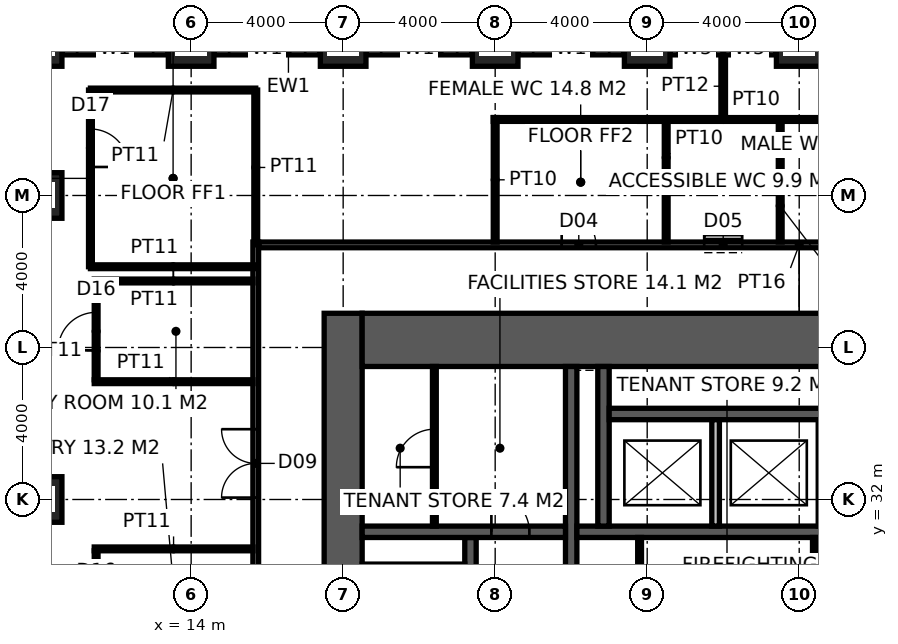
"""IFC4 building model, lengths in metres.
Left out: names, types, materials, properties, quantities, classifications, styles, units other than length and angle.
Written with IfcOpenShell. Run it as: python <this file> out.ifc"""

import sys

from ifc_helpers import new_model, si_unit, direction, frame, frame_2d, origin, origin_2d, place, context, subcontext, project, spatial, rectangle, hollow_rectangle, extrude, element, fill, save


model = new_model("IFC4")
c1 = context("Model", 3, precision=1e-05, world=origin(), true_north=direction((0.0, 1.0)))
c2 = subcontext(c1, "Body", "Model", "MODEL_VIEW")
j1 = project(units=[si_unit("LENGTHUNIT", "METRE"), si_unit("PLANEANGLEUNIT", "RADIAN")], contexts=[c1])
p1 = place(None, origin())
s1 = spatial("IfcSite", under=j1, at=p1, CompositionType="ELEMENT")
p2 = place(p1, origin())
s2 = spatial("IfcBuilding", under=s1, at=p2, CompositionType="ELEMENT")
p3 = place(p2, frame((0.0, 0.0, 19.0)))
s3 = spatial("IfcBuildingStorey", under=s2, at=p3, CompositionType="ELEMENT", Elevation=19.0)
for number, where, z_axis, x_axis in (
    (1, (10.0, 44.0, 0.0), (0.0, 0.0, 1.0), (1.0, 0.0, 0.0)),
    (2, (14.0, 44.0, 0.0), (0.0, 0.0, 1.0), (1.0, 0.0, 0.0)),
    (3, (18.0, 44.0, 0.0), (0.0, 0.0, 1.0), (1.0, 0.0, 0.0)),
    (4, (22.0, 44.0, 0.0), (0.0, 0.0, 1.0), (1.0, 0.0, 0.0)),
    (5, (26.0, 44.0, 0.0), (0.0, 0.0, 1.0), (1.0, 0.0, 0.0)),
    (6, (30.0, 44.0, 0.0), (0.0, 0.0, 1.0), (1.0, 0.0, 0.0)),
    (7, (10.0, 32.0, 0.0), (0.0, 0.0, 1.0), (1.0, 0.0, 0.0)),
    (8, (10.0, 40.0, 0.0), (0.0, 0.0, 1.0), (1.0, 0.0, 0.0)),
):
    element("IfcColumn", number, at=place(p3, frame(where, z_axis=z_axis, x_axis=x_axis)), inside=s3, PredefinedType="COLUMN", context=c2, shape_type="SweptSolid", body=[
        extrude(hollow_rectangle(XDim=1.2, YDim=1.2, WallThickness=0.1, at=origin_2d()), origin(), (0.0, 0.0, 1.0), 4.0),
    ])
p4 = place(p3, frame((18.0, 17.1, -0.15), z_axis=(0.0, 0.0, 1.0), x_axis=(0.0, 1.0, 0.0)))
e9 = element("IfcWall", 9, at=p4, inside=s3, PredefinedType="SHEAR", context=c2, shape_type="SweptSolid", body=[
    extrude(rectangle(XDim=19.8, YDim=1.0, at=frame_2d((9.9, 0.0))), origin(), (0.0, 0.0, 1.0), 4.0),
])
p5 = place(p3, frame((18.5, 36.2, -0.15), z_axis=(0.0, 0.0, 1.0), x_axis=(1.0, 0.0, 0.0)))
e10 = element("IfcWall", 10, at=p5, inside=s3, PredefinedType="SHEAR", context=c2, shape_type="SweptSolid", body=[
    extrude(rectangle(XDim=23.0, YDim=1.4, at=frame_2d((11.5, 0.0))), origin(), (0.0, 0.0, 1.0), 4.0),
])
p6 = place(p3, frame((24.0, 18.5, -0.15), z_axis=(0.0, 0.0, 1.0), x_axis=(0.0, 1.0, 0.0)))
e11 = element("IfcWall", 11, at=p6, inside=s3, PredefinedType="SHEAR", context=c2, shape_type="SweptSolid", body=[
    extrude(rectangle(XDim=17.0, YDim=0.3, at=frame_2d((8.5, 0.0))), origin(), (0.0, 0.0, 1.0), 4.0),
])
p7 = place(p6, frame((9.6, 0.0, 0.15)))
e12 = element("IfcOpeningElement", 12, at=p7, cuts=e11, PredefinedType="OPENING", context=c2, shape_type="SweptSolid", body=[
    extrude(rectangle(XDim=1.5, YDim=2.4, at=frame_2d((0.75, 1.2))), frame((0.0, 0.16, 0.0), z_axis=(0.0, -1.0, 0.0), x_axis=(1.0, 0.0, 0.0)), (0.0, 0.0, 1.0), 0.32),
])
p8 = place(p3, frame((24.15, 31.15, -0.15), z_axis=(0.0, 0.0, 1.0), x_axis=(1.0, 0.0, 0.0)))
e13 = element("IfcWall", 13, at=p8, inside=s3, PredefinedType="SHEAR", context=c2, shape_type="SweptSolid", body=[
    extrude(rectangle(XDim=11.25, YDim=0.3, at=frame_2d((5.625, 0.0))), origin(), (0.0, 0.0, 1.0), 4.0),
])
p9 = place(p8, frame((7.25, 0.0, 0.15)))
e14 = element("IfcOpeningElement", 14, at=p9, cuts=e13, PredefinedType="OPENING", context=c2, shape_type="SweptSolid", body=[
    extrude(rectangle(XDim=1.4, YDim=2.4, at=frame_2d((0.7, 1.2))), frame((0.0, 0.16, 0.0), z_axis=(0.0, -1.0, 0.0), x_axis=(1.0, 0.0, 0.0)), (0.0, 0.0, 1.0), 0.32),
])
p10 = place(p3, frame((21.35, 18.5, -0.15), z_axis=(0.0, 0.0, 1.0), x_axis=(0.0, 1.0, 0.0)))
e15 = element("IfcWall", 15, at=p10, inside=s3, PredefinedType="SHEAR", context=c2, shape_type="SweptSolid", body=[
    extrude(rectangle(XDim=12.5, YDim=0.3, at=frame_2d((6.25, 0.0))), origin(), (0.0, 0.0, 1.0), 4.0),
])
p11 = place(p10, frame((6.725, 0.0, 0.15)))
e16 = element("IfcOpeningElement", 16, at=p11, cuts=e15, PredefinedType="OPENING", context=c2, shape_type="SweptSolid", body=[
    extrude(rectangle(XDim=1.0, YDim=2.2, at=frame_2d((0.5, 1.1))), frame((0.0, 0.16, 0.0), z_axis=(0.0, -1.0, 0.0), x_axis=(1.0, 0.0, 0.0)), (0.0, 0.0, 1.0), 0.32),
])
p12 = place(p3, frame((18.5, 31.15, -0.15), z_axis=(0.0, 0.0, 1.0), x_axis=(1.0, 0.0, 0.0)))
e17 = element("IfcWall", 17, at=p12, inside=s3, PredefinedType="SHEAR", context=c2, shape_type="SweptSolid", body=[
    extrude(rectangle(XDim=5.35, YDim=0.3, at=frame_2d((2.675, 0.0))), origin(), (0.0, 0.0, 1.0), 4.0),
])
p13 = place(p12, frame((3.4, 0.0, 0.15)))
e18 = element("IfcOpeningElement", 18, at=p13, cuts=e17, PredefinedType="OPENING", context=c2, shape_type="SweptSolid", body=[
    extrude(rectangle(XDim=1.0, YDim=2.2, at=frame_2d((0.5, 1.1))), frame((0.0, 0.16, 0.0), z_axis=(0.0, -1.0, 0.0), x_axis=(1.0, 0.0, 0.0)), (0.0, 0.0, 1.0), 0.32),
])
p14 = place(p3, frame((24.85, 31.3, -0.15), z_axis=(0.0, 0.0, 1.0), x_axis=(0.0, 1.0, 0.0)))
e19 = element("IfcWall", 19, at=p14, inside=s3, PredefinedType="SHEAR", context=c2, shape_type="SweptSolid", body=[
    extrude(rectangle(XDim=4.2, YDim=0.3, at=frame_2d((2.1, 0.0))), origin(), (0.0, 0.0, 1.0), 4.0),
])
p15 = place(p3, frame((25.0, 34.25, -0.15), z_axis=(0.0, 0.0, 1.0), x_axis=(1.0, 0.0, 0.0)))
e20 = element("IfcWall", 20, at=p15, inside=s3, PredefinedType="SHEAR", context=c2, shape_type="SweptSolid", body=[
    extrude(rectangle(XDim=8.6, YDim=0.3, at=frame_2d((4.3, 0.0))), origin(), (0.0, 0.0, 1.0), 4.0),
])
p16 = place(p3, frame((27.8, 31.3, -0.15), z_axis=(0.0, 0.0, 1.0), x_axis=(0.0, 1.0, 0.0)))
e21 = element("IfcWall", 21, at=p16, inside=s3, PredefinedType="SOLIDWALL", context=c2, shape_type="SweptSolid", body=[
    extrude(rectangle(XDim=2.8, YDim=0.2, at=frame_2d((1.4, 0.0))), origin(), (0.0, 0.0, 1.0), 4.0),
])
p17 = place(p3, frame((20.4, 31.3, 0.0), z_axis=(0.0, 0.0, 1.0), x_axis=(0.0, 1.0, 0.0)))
e22 = element("IfcWall", 22, at=p17, inside=s3, PredefinedType="PARTITIONING", context=c2, shape_type="SweptSolid", body=[
    extrude(rectangle(XDim=4.2, YDim=0.1, at=frame_2d((2.1, 0.0))), origin(), (0.0, 0.0, 1.0), 3.85),
])
p18 = place(p17, frame((1.55, 0.0, 0.0)))
e23 = element("IfcOpeningElement", 23, at=p18, cuts=e22, PredefinedType="OPENING", context=c2, shape_type="SweptSolid", body=[
    extrude(rectangle(XDim=1.0, YDim=2.2, at=frame_2d((0.5, 1.1))), frame((0.0, 0.06, 0.0), z_axis=(0.0, -1.0, 0.0), x_axis=(1.0, 0.0, 0.0)), (0.0, 0.0, 1.0), 0.12),
])
for number, where, z_axis, x_axis in (
    (24, (25.8, 29.05, 0.0), (0.0, 0.0, 1.0), (0.0, 1.0, 0.0)),
    (25, (30.4, 29.05, 0.0), (0.0, 0.0, 1.0), (0.0, 1.0, 0.0)),
):
    element("IfcWall", number, at=place(p3, frame(where, z_axis=z_axis, x_axis=x_axis)), inside=s3, PredefinedType="PARTITIONING", context=c2, shape_type="SweptSolid", body=[
        extrude(rectangle(XDim=1.95, YDim=0.1, at=frame_2d((0.975, 0.0))), origin(), (0.0, 0.0, 1.0), 3.85),
    ])
p19 = place(p3, frame((15.7, 15.225, 0.0), z_axis=(0.0, 0.0, 1.0), x_axis=(0.0, 1.0, 0.0)))
e26 = element("IfcWall", 26, at=p19, inside=s3, PredefinedType="PARTITIONING", context=c2, shape_type="SweptSolid", body=[
    extrude(rectangle(XDim=23.55, YDim=0.15, at=frame_2d((11.775, 0.0))), origin(), (0.0, 0.0, 1.0), 3.85),
])
p20 = place(p19, frame((5.175, 0.0, 0.0)))
e27 = element("IfcOpeningElement", 27, at=p20, cuts=e26, PredefinedType="OPENING", context=c2, shape_type="SweptSolid", body=[
    extrude(rectangle(XDim=1.8, YDim=2.4, at=frame_2d((0.9, 1.2))), frame((0.0, 0.085, 0.0), z_axis=(0.0, -1.0, 0.0), x_axis=(1.0, 0.0, 0.0)), (0.0, 0.0, 1.0), 0.17),
])
p21 = place(p19, frame((16.825, 0.0, 0.0)))
e28 = element("IfcOpeningElement", 28, at=p21, cuts=e26, PredefinedType="OPENING", context=c2, shape_type="SweptSolid", body=[
    extrude(rectangle(XDim=1.8, YDim=2.4, at=frame_2d((0.9, 1.2))), frame((0.0, 0.085, 0.0), z_axis=(0.0, -1.0, 0.0), x_axis=(1.0, 0.0, 0.0)), (0.0, 0.0, 1.0), 0.17),
])
p22 = place(p3, frame((15.775, 38.7, 0.0), z_axis=(0.0, 0.0, 1.0), x_axis=(1.0, 0.0, 0.0)))
e29 = element("IfcWall", 29, at=p22, inside=s3, PredefinedType="PARTITIONING", context=c2, shape_type="SweptSolid", body=[
    extrude(rectangle(XDim=28.45, YDim=0.15, at=frame_2d((14.225, 0.0))), origin(), (0.0, 0.0, 1.0), 3.85),
])
p23 = place(p22, frame((7.975, 0.0, 0.0)))
e30 = element("IfcOpeningElement", 30, at=p23, cuts=e29, PredefinedType="OPENING", context=c2, shape_type="SweptSolid", body=[
    extrude(rectangle(XDim=0.9, YDim=2.1, at=frame_2d((0.45, 1.05))), frame((0.0, 0.085, 0.0), z_axis=(0.0, -1.0, 0.0), x_axis=(1.0, 0.0, 0.0)), (0.0, 0.0, 1.0), 0.17),
])
p24 = place(p22, frame((11.725, 0.0, 0.0)))
e31 = element("IfcOpeningElement", 31, at=p24, cuts=e29, PredefinedType="OPENING", context=c2, shape_type="SweptSolid", body=[
    extrude(rectangle(XDim=1.0, YDim=2.1, at=frame_2d((0.5, 1.05))), frame((0.0, 0.085, 0.0), z_axis=(0.0, -1.0, 0.0), x_axis=(1.0, 0.0, 0.0)), (0.0, 0.0, 1.0), 0.17),
])
p25 = place(p22, frame((15.575, 0.0, 0.0)))
e32 = element("IfcOpeningElement", 32, at=p25, cuts=e29, PredefinedType="OPENING", context=c2, shape_type="SweptSolid", body=[
    extrude(rectangle(XDim=0.9, YDim=2.1, at=frame_2d((0.45, 1.05))), frame((0.0, 0.085, 0.0), z_axis=(0.0, -1.0, 0.0), x_axis=(1.0, 0.0, 0.0)), (0.0, 0.0, 1.0), 0.17),
])
p26 = place(p3, frame((22.0, 38.775, 0.0), z_axis=(0.0, 0.0, 1.0), x_axis=(0.0, 1.0, 0.0)))
e33 = element("IfcWall", 33, at=p26, inside=s3, PredefinedType="PARTITIONING", context=c2, shape_type="SweptSolid", body=[
    extrude(rectangle(XDim=3.275, YDim=0.1, at=frame_2d((1.638, 0.0))), origin(), (0.0, 0.0, 1.0), 2.95),
])
p27 = place(p3, frame((21.95, 42.0, 0.0), z_axis=(0.0, 0.0, 1.0), x_axis=(1.0, 0.0, 0.0)))
e34 = element("IfcWall", 34, at=p27, inside=s3, PredefinedType="PARTITIONING", context=c2, shape_type="SweptSolid", body=[
    extrude(rectangle(XDim=12.1, YDim=0.1, at=frame_2d((6.05, 0.0))), origin(), (0.0, 0.0, 1.0), 3.85),
])
for number, where, z_axis, x_axis in (
    (35, (26.5, 38.775, 0.0), (0.0, 0.0, 1.0), (0.0, 1.0, 0.0)),
    (36, (29.5, 38.775, 0.0), (0.0, 0.0, 1.0), (0.0, 1.0, 0.0)),
):
    element("IfcWall", number, at=place(p3, frame(where, z_axis=z_axis, x_axis=x_axis)), inside=s3, PredefinedType="PARTITIONING", context=c2, shape_type="SweptSolid", body=[
        extrude(rectangle(XDim=3.175, YDim=0.1, at=frame_2d((1.587, 0.0))), origin(), (0.0, 0.0, 1.0), 3.85),
    ])
p28 = place(p3, frame((28.0, 42.05, 0.0), z_axis=(0.0, 0.0, 1.0), x_axis=(0.0, 1.0, 0.0)))
e37 = element("IfcWall", 37, at=p28, inside=s3, PredefinedType="PARTITIONING", context=c2, shape_type="SweptSolid", body=[
    extrude(rectangle(XDim=1.65, YDim=0.12, at=frame_2d((0.825, 0.0))), origin(), (0.0, 0.0, 1.0), 3.85),
])
for number, where, z_axis, x_axis in (
    (38, (11.45, 30.7, 0.0), (0.0, 0.0, 1.0), (1.0, 0.0, 0.0)),
    (39, (11.45, 35.1, 0.0), (0.0, 0.0, 1.0), (1.0, 0.0, 0.0)),
    (40, (11.45, 37.75, 0.0), (0.0, 0.0, 1.0), (1.0, 0.0, 0.0)),
):
    element("IfcWall", number, at=place(p3, frame(where, z_axis=z_axis, x_axis=x_axis)), inside=s3, PredefinedType="PARTITIONING", context=c2, shape_type="SweptSolid", body=[
        extrude(rectangle(XDim=4.175, YDim=0.1, at=frame_2d((2.087, 0.0))), origin(), (0.0, 0.0, 1.0), 3.85),
    ])
p29 = place(p3, frame((11.5, 27.35, 0.0), z_axis=(0.0, 0.0, 1.0), x_axis=(0.0, 1.0, 0.0)))
e41 = element("IfcWall", 41, at=p29, inside=s3, PredefinedType="PARTITIONING", context=c2, shape_type="SweptSolid", body=[
    extrude(rectangle(XDim=3.3, YDim=0.1, at=frame_2d((1.65, 0.0))), origin(), (0.0, 0.0, 1.0), 3.85),
])
p30 = place(p29, frame((1.15, 0.0, 0.0)))
e42 = element("IfcOpeningElement", 42, at=p30, cuts=e41, PredefinedType="OPENING", context=c2, shape_type="SweptSolid", body=[
    extrude(rectangle(XDim=1.0, YDim=2.2, at=frame_2d((0.5, 1.1))), frame((0.0, 0.06, 0.0), z_axis=(0.0, -1.0, 0.0), x_axis=(1.0, 0.0, 0.0)), (0.0, 0.0, 1.0), 0.12),
])
p31 = place(p3, frame((11.5, 35.15, 0.0), z_axis=(0.0, 0.0, 1.0), x_axis=(0.0, 1.0, 0.0)))
e43 = element("IfcWall", 43, at=p31, inside=s3, PredefinedType="PARTITIONING", context=c2, shape_type="SweptSolid", body=[
    extrude(rectangle(XDim=2.55, YDim=0.1, at=frame_2d((1.275, 0.0))), origin(), (0.0, 0.0, 1.0), 3.85),
])
p32 = place(p31, frame((0.775, 0.0, 0.0)))
e44 = element("IfcOpeningElement", 44, at=p32, cuts=e43, PredefinedType="OPENING", context=c2, shape_type="SweptSolid", body=[
    extrude(rectangle(XDim=1.0, YDim=2.2, at=frame_2d((0.5, 1.1))), frame((0.0, 0.06, 0.0), z_axis=(0.0, -1.0, 0.0), x_axis=(1.0, 0.0, 0.0)), (0.0, 0.0, 1.0), 0.12),
])
p33 = place(p3, frame((15.7, 38.7, 0.0), z_axis=(0.0, 0.0, 1.0), x_axis=(0.0, 1.0, 0.0)))
e45 = element("IfcWall", 45, at=p33, inside=s3, PredefinedType="PARTITIONING", context=c2, shape_type="SweptSolid", body=[
    extrude(rectangle(XDim=4.075, YDim=0.1, at=frame_2d((2.038, 0.0))), origin(), (0.0, 0.0, 1.0), 3.85),
])
p34 = place(p3, frame((15.7, 42.775, 0.0), z_axis=(0.0, 0.0, 1.0), x_axis=(-1.0, 0.0, 0.0)))
e46 = element("IfcWall", 46, at=p34, inside=s3, PredefinedType="PARTITIONING", context=c2, shape_type="SweptSolid", body=[
    extrude(rectangle(XDim=4.35, YDim=0.1, at=frame_2d((2.175, 0.0))), origin(), (0.0, 0.0, 1.0), 3.85),
])
p35 = place(p3, frame((11.35, 42.775, 0.0), z_axis=(0.0, 0.0, 1.0), x_axis=(0.0, -1.0, 0.0)))
e47 = element("IfcWall", 47, at=p35, inside=s3, PredefinedType="PARTITIONING", context=c2, shape_type="SweptSolid", body=[
    extrude(rectangle(XDim=4.65, YDim=0.1, at=frame_2d((2.325, 0.0))), origin(), (0.0, 0.0, 1.0), 3.85),
])
p36 = place(p35, frame((1.025, 0.0, 0.0)))
e48 = element("IfcOpeningElement", 48, at=p36, cuts=e47, PredefinedType="OPENING", context=c2, shape_type="SweptSolid", body=[
    extrude(rectangle(XDim=1.0, YDim=2.2, at=frame_2d((0.5, 1.1))), frame((0.0, 0.06, 0.0), z_axis=(0.0, -1.0, 0.0), x_axis=(1.0, 0.0, 0.0)), (0.0, 0.0, 1.0), 0.12),
])
p37 = place(p3, frame((11.35, 38.125, 0.0), z_axis=(0.0, 0.0, 1.0), x_axis=(1.0, 0.0, 0.0)))
e49 = element("IfcWall", 49, at=p37, inside=s3, PredefinedType="PARTITIONING", context=c2, shape_type="SweptSolid", body=[
    extrude(rectangle(XDim=4.35, YDim=0.1, at=frame_2d((2.175, 0.0))), origin(), (0.0, 0.0, 1.0), 3.85),
])
p38 = place(p3, frame((13.4, 43.85, 0.0), z_axis=(0.0, 0.0, 1.0), x_axis=(-1.0, 0.0, 0.0)))
e50 = element("IfcWall", 50, at=p38, inside=s3, PredefinedType="ELEMENTEDWALL", context=c2, shape_type="SweptSolid", body=[
    extrude(rectangle(XDim=2.8, YDim=0.3, at=frame_2d((1.4, 0.0))), origin(), (0.0, 0.0, 1.0), 2.85),
])
p39 = place(p38, frame((0.4, 0.0, 0.8)))
e51 = element("IfcOpeningElement", 51, at=p39, cuts=e50, PredefinedType="OPENING", context=c2, shape_type="SweptSolid", body=[
    extrude(rectangle(XDim=2.0, YDim=2.0, at=frame_2d((1.0, 1.0))), frame((0.0, 0.16, 0.0), z_axis=(0.0, -1.0, 0.0), x_axis=(1.0, 0.0, 0.0)), (0.0, 0.0, 1.0), 0.32),
])
p40 = place(p3, frame((17.4, 43.85, 0.0), z_axis=(0.0, 0.0, 1.0), x_axis=(-1.0, 0.0, 0.0)))
e52 = element("IfcWall", 52, at=p40, inside=s3, PredefinedType="ELEMENTEDWALL", context=c2, shape_type="SweptSolid", body=[
    extrude(rectangle(XDim=2.8, YDim=0.3, at=frame_2d((1.4, 0.0))), origin(), (0.0, 0.0, 1.0), 2.85),
])
p41 = place(p40, frame((0.4, 0.0, 0.8)))
e53 = element("IfcOpeningElement", 53, at=p41, cuts=e52, PredefinedType="OPENING", context=c2, shape_type="SweptSolid", body=[
    extrude(rectangle(XDim=2.0, YDim=2.0, at=frame_2d((1.0, 1.0))), frame((0.0, 0.16, 0.0), z_axis=(0.0, -1.0, 0.0), x_axis=(1.0, 0.0, 0.0)), (0.0, 0.0, 1.0), 0.32),
])
p42 = place(p3, frame((21.4, 43.85, 0.0), z_axis=(0.0, 0.0, 1.0), x_axis=(-1.0, 0.0, 0.0)))
e54 = element("IfcWall", 54, at=p42, inside=s3, PredefinedType="ELEMENTEDWALL", context=c2, shape_type="SweptSolid", body=[
    extrude(rectangle(XDim=2.8, YDim=0.3, at=frame_2d((1.4, 0.0))), origin(), (0.0, 0.0, 1.0), 2.85),
])
p43 = place(p42, frame((0.4, 0.0, 0.8)))
e55 = element("IfcOpeningElement", 55, at=p43, cuts=e54, PredefinedType="OPENING", context=c2, shape_type="SweptSolid", body=[
    extrude(rectangle(XDim=2.0, YDim=2.0, at=frame_2d((1.0, 1.0))), frame((0.0, 0.16, 0.0), z_axis=(0.0, -1.0, 0.0), x_axis=(1.0, 0.0, 0.0)), (0.0, 0.0, 1.0), 0.32),
])
p44 = place(p3, frame((25.4, 43.85, 0.0), z_axis=(0.0, 0.0, 1.0), x_axis=(-1.0, 0.0, 0.0)))
e56 = element("IfcWall", 56, at=p44, inside=s3, PredefinedType="ELEMENTEDWALL", context=c2, shape_type="SweptSolid", body=[
    extrude(rectangle(XDim=2.8, YDim=0.3, at=frame_2d((1.4, 0.0))), origin(), (0.0, 0.0, 1.0), 2.85),
])
p45 = place(p44, frame((0.4, 0.0, 0.8)))
e57 = element("IfcOpeningElement", 57, at=p45, cuts=e56, PredefinedType="OPENING", context=c2, shape_type="SweptSolid", body=[
    extrude(rectangle(XDim=2.0, YDim=2.0, at=frame_2d((1.0, 1.0))), frame((0.0, 0.16, 0.0), z_axis=(0.0, -1.0, 0.0), x_axis=(1.0, 0.0, 0.0)), (0.0, 0.0, 1.0), 0.32),
])
p46 = place(p3, frame((29.4, 43.85, 0.0), z_axis=(0.0, 0.0, 1.0), x_axis=(-1.0, 0.0, 0.0)))
e58 = element("IfcWall", 58, at=p46, inside=s3, PredefinedType="ELEMENTEDWALL", context=c2, shape_type="SweptSolid", body=[
    extrude(rectangle(XDim=2.8, YDim=0.3, at=frame_2d((1.4, 0.0))), origin(), (0.0, 0.0, 1.0), 2.85),
])
p47 = place(p46, frame((1.6, 0.0, 0.8)))
e59 = element("IfcOpeningElement", 59, at=p47, cuts=e58, PredefinedType="OPENING", context=c2, shape_type="SweptSolid", body=[
    extrude(rectangle(XDim=1.0, YDim=2.0, at=frame_2d((0.5, 1.0))), frame((0.0, 0.16, 0.0), z_axis=(0.0, -1.0, 0.0), x_axis=(1.0, 0.0, 0.0)), (0.0, 0.0, 1.0), 0.32),
])
p48 = place(p46, frame((0.2, 0.0, 0.8)))
e60 = element("IfcOpeningElement", 60, at=p48, cuts=e58, PredefinedType="OPENING", context=c2, shape_type="SweptSolid", body=[
    extrude(rectangle(XDim=1.0, YDim=2.0, at=frame_2d((0.5, 1.0))), frame((0.0, 0.16, 0.0), z_axis=(0.0, -1.0, 0.0), x_axis=(1.0, 0.0, 0.0)), (0.0, 0.0, 1.0), 0.32),
])
p49 = place(p13, origin())
e61 = element("IfcDoor", 61, at=p49, inside=s3, OperationType="SINGLE_SWING_LEFT", PredefinedType="DOOR", context=c2, shape_type="SweptSolid", body=[
    extrude(rectangle(XDim=1.0, YDim=2.2, at=frame_2d((0.5, 1.1))), frame((0.0, 0.025, 0.0), z_axis=(0.0, -1.0, 0.0), x_axis=(1.0, 0.0, 0.0)), (0.0, 0.0, 1.0), 0.05),
])
fill(e18, e61)
p50 = place(p18, origin())
e62 = element("IfcDoor", 62, at=p50, inside=s3, OperationType="SINGLE_SWING_LEFT", PredefinedType="DOOR", context=c2, shape_type="SweptSolid", body=[
    extrude(rectangle(XDim=1.0, YDim=2.2, at=frame_2d((0.5, 1.1))), frame((0.0, 0.025, 0.0), z_axis=(0.0, -1.0, 0.0), x_axis=(1.0, 0.0, 0.0)), (0.0, 0.0, 1.0), 0.05),
])
fill(e23, e62)
p51 = place(p23, origin())
e63 = element("IfcDoor", 63, at=p51, inside=s3, OperationType="SINGLE_SWING_LEFT", PredefinedType="DOOR", context=c2, shape_type="SweptSolid", body=[
    extrude(rectangle(XDim=0.9, YDim=2.1, at=frame_2d((0.45, 1.05))), frame((0.0, 0.025, 0.0), z_axis=(0.0, -1.0, 0.0), x_axis=(1.0, 0.0, 0.0)), (0.0, 0.0, 1.0), 0.05),
])
fill(e30, e63)
p52 = place(p24, origin())
e64 = element("IfcDoor", 64, at=p52, inside=s3, OperationType="SLIDING_TO_LEFT", PredefinedType="DOOR", context=c2, shape_type="SweptSolid", body=[
    extrude(rectangle(XDim=1.0, YDim=2.1, at=frame_2d((0.5, 1.05))), frame((0.0, 0.025, 0.0), z_axis=(0.0, -1.0, 0.0), x_axis=(1.0, 0.0, 0.0)), (0.0, 0.0, 1.0), 0.05),
])
fill(e31, e64)
p53 = place(p21, origin())
e65 = element("IfcDoor", 65, at=p53, inside=s3, OperationType="DOUBLE_DOOR_DOUBLE_SWING", PredefinedType="DOOR", context=c2, shape_type="SweptSolid", body=[
    extrude(rectangle(XDim=1.8, YDim=2.4, at=frame_2d((0.9, 1.2))), frame((0.0, 0.025, 0.0), z_axis=(0.0, -1.0, 0.0), x_axis=(1.0, 0.0, 0.0)), (0.0, 0.0, 1.0), 0.05),
])
fill(e28, e65)
p54 = place(p32, origin())
e66 = element("IfcDoor", 66, at=p54, inside=s3, OperationType="SINGLE_SWING_LEFT", PredefinedType="DOOR", context=c2, shape_type="SweptSolid", body=[
    extrude(rectangle(XDim=1.0, YDim=2.2, at=frame_2d((0.5, 1.1))), frame((0.0, 0.025, 0.0), z_axis=(0.0, -1.0, 0.0), x_axis=(1.0, 0.0, 0.0)), (0.0, 0.0, 1.0), 0.05),
])
fill(e44, e66)
p55 = place(p36, origin())
e67 = element("IfcDoor", 67, at=p55, inside=s3, OperationType="SINGLE_SWING_RIGHT", PredefinedType="DOOR", context=c2, shape_type="SweptSolid", body=[
    extrude(rectangle(XDim=1.0, YDim=2.2, at=frame_2d((0.5, 1.1))), frame((0.0, 0.025, 0.0), z_axis=(0.0, -1.0, 0.0), x_axis=(1.0, 0.0, 0.0)), (0.0, 0.0, 1.0), 0.05),
])
fill(e48, e67)
save(model, sys.argv[1])
